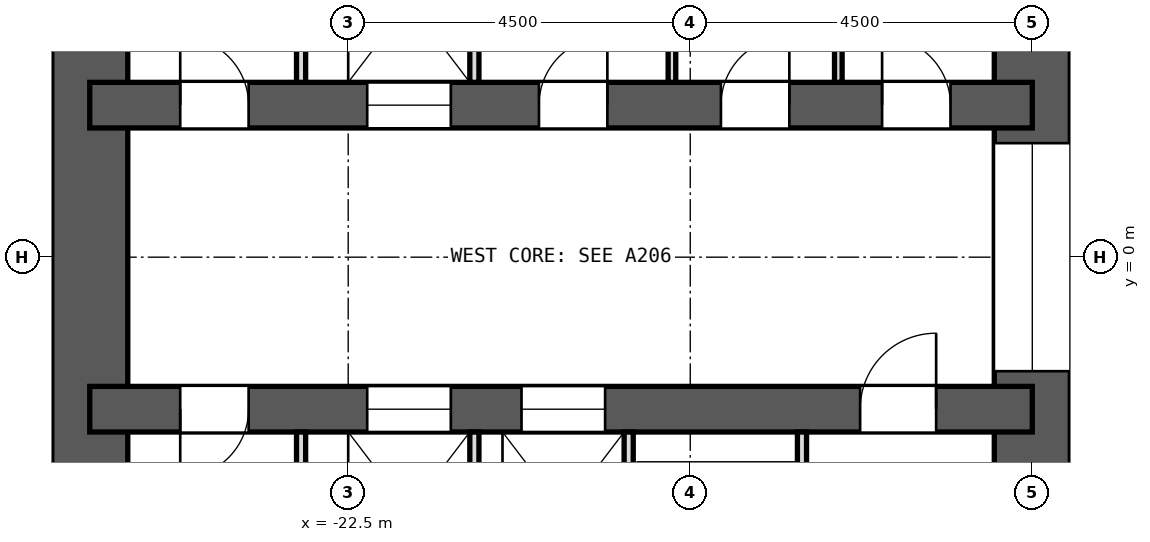
"""IFC4 building model, lengths in metres.
Left out: names, types, materials, properties, quantities, classifications, styles, units other than length and angle.
Written with IfcOpenShell. Run it as: python <this file> out.ifc"""

import sys

from ifc_helpers import new_model, si_unit, direction, frame, frame_2d, origin, place, context, subcontext, project, spatial, rectangle, extrude, element, fill, save


model = new_model("IFC4")
c1 = context("Model", 3, precision=1e-05, world=origin(), true_north=direction((0.0, 1.0)))
c2 = subcontext(c1, "Body", "Model", "MODEL_VIEW")
j1 = project(units=[si_unit("LENGTHUNIT", "METRE"), si_unit("PLANEANGLEUNIT", "RADIAN")], contexts=[c1])
p1 = place(None, origin())
s1 = spatial("IfcSite", under=j1, at=p1, CompositionType="ELEMENT")
p2 = place(p1, origin())
s2 = spatial("IfcBuilding", under=s1, at=p2, CompositionType="ELEMENT")
p3 = place(p2, frame((0.0, 0.0, 13.4)))
s3 = spatial("IfcBuildingStorey", under=s2, at=p3, CompositionType="ELEMENT", Elevation=13.4)
p4 = place(p3, frame((-13.5, -9.0, 0.0), z_axis=(0.0, 0.0, 1.0), x_axis=(0.0, 1.0, 0.0)))
e1 = element("IfcWall", 1, at=p4, inside=s3, PredefinedType="SHEAR", context=c2, shape_type="SweptSolid", body=[
    extrude(rectangle(XDim=18.0, YDim=1.0, at=frame_2d((9.0, 0.0))), origin(), (0.0, 0.0, 1.0), 4.2),
])
p5 = place(p4, frame((15.4, 0.0, 0.0)))
e2 = element("IfcOpeningElement", 2, at=p5, cuts=e1, PredefinedType="OPENING", context=c2, shape_type="SweptSolid", body=[
    extrude(rectangle(XDim=1.2, YDim=2.1, at=frame_2d((0.6, 1.05))), frame((0.0, 0.512, 0.0), z_axis=(0.0, -1.0, 0.0), x_axis=(1.0, 0.0, 0.0)), (0.0, 0.0, 1.0), 1.024),
])
p6 = place(p4, frame((1.4, 0.0, 0.0)))
e3 = element("IfcOpeningElement", 3, at=p6, cuts=e1, PredefinedType="OPENING", context=c2, shape_type="SweptSolid", body=[
    extrude(rectangle(XDim=1.2, YDim=2.1, at=frame_2d((0.6, 1.05))), frame((0.0, 0.512, 0.0), z_axis=(0.0, -1.0, 0.0), x_axis=(1.0, 0.0, 0.0)), (0.0, 0.0, 1.0), 1.024),
])
p7 = place(p4, frame((7.5, 0.0, 0.0)))
e4 = element("IfcOpeningElement", 4, at=p7, cuts=e1, PredefinedType="OPENING", context=c2, shape_type="SweptSolid", body=[
    extrude(rectangle(XDim=3.0, YDim=2.4, at=frame_2d((1.5, 1.2))), frame((0.0, 0.512, 0.0), z_axis=(0.0, -1.0, 0.0), x_axis=(1.0, 0.0, 0.0)), (0.0, 0.0, 1.0), 1.024),
])
p8 = place(p3, frame((-25.9, -9.0, 0.0), z_axis=(0.0, 0.0, 1.0), x_axis=(0.0, 1.0, 0.0)))
e5 = element("IfcWall", 5, at=p8, inside=s3, PredefinedType="SHEAR", context=c2, shape_type="SweptSolid", body=[
    extrude(rectangle(XDim=18.0, YDim=1.0, at=frame_2d((9.0, 0.0))), origin(), (0.0, 0.0, 1.0), 4.2),
])
p9 = place(p3, frame((-13.5, 2.0, 0.0), z_axis=(0.0, 0.0, 1.0), x_axis=(-1.0, 0.0, 0.0)))
e6 = element("IfcWall", 6, at=p9, inside=s3, PredefinedType="SHEAR", context=c2, shape_type="SweptSolid", body=[
    extrude(rectangle(XDim=12.4, YDim=0.6, at=frame_2d((6.2, 0.0))), origin(), (0.0, 0.0, 1.0), 4.2),
])
p10 = place(p9, frame((7.65, 0.0, 0.0)))
e7 = element("IfcOpeningElement", 7, at=p10, cuts=e6, PredefinedType="OPENING", context=c2, shape_type="SweptSolid", body=[
    extrude(rectangle(XDim=1.1, YDim=2.1, at=frame_2d((0.55, 1.05))), frame((0.0, 0.312, 0.0), z_axis=(0.0, -1.0, 0.0), x_axis=(1.0, 0.0, 0.0)), (0.0, 0.0, 1.0), 0.624),
])
p11 = place(p9, frame((1.076, 0.0, 0.0)))
e8 = element("IfcOpeningElement", 8, at=p11, cuts=e6, PredefinedType="OPENING", context=c2, shape_type="SweptSolid", body=[
    extrude(rectangle(XDim=0.9, YDim=2.1, at=frame_2d((0.45, 1.05))), frame((0.0, 0.312, 0.0), z_axis=(0.0, -1.0, 0.0), x_axis=(1.0, 0.0, 0.0)), (0.0, 0.0, 1.0), 0.624),
])
p12 = place(p9, frame((3.196, 0.0, 0.0)))
e9 = element("IfcOpeningElement", 9, at=p12, cuts=e6, PredefinedType="OPENING", context=c2, shape_type="SweptSolid", body=[
    extrude(rectangle(XDim=0.9, YDim=2.1, at=frame_2d((0.45, 1.05))), frame((0.0, 0.312, 0.0), z_axis=(0.0, -1.0, 0.0), x_axis=(1.0, 0.0, 0.0)), (0.0, 0.0, 1.0), 0.624),
])
p13 = place(p9, frame((5.59, 0.0, 0.0)))
e10 = element("IfcOpeningElement", 10, at=p13, cuts=e6, PredefinedType="OPENING", context=c2, shape_type="SweptSolid", body=[
    extrude(rectangle(XDim=0.9, YDim=2.1, at=frame_2d((0.45, 1.05))), frame((0.0, 0.312, 0.0), z_axis=(0.0, -1.0, 0.0), x_axis=(1.0, 0.0, 0.0)), (0.0, 0.0, 1.0), 0.624),
])
p14 = place(p9, frame((10.31, 0.0, 0.0)))
e11 = element("IfcOpeningElement", 11, at=p14, cuts=e6, PredefinedType="OPENING", context=c2, shape_type="SweptSolid", body=[
    extrude(rectangle(XDim=0.9, YDim=2.1, at=frame_2d((0.45, 1.05))), frame((0.0, 0.312, 0.0), z_axis=(0.0, -1.0, 0.0), x_axis=(1.0, 0.0, 0.0)), (0.0, 0.0, 1.0), 0.624),
])
p15 = place(p3, frame((-13.5, -2.0, 0.0), z_axis=(0.0, 0.0, 1.0), x_axis=(-1.0, 0.0, 0.0)))
e12 = element("IfcWall", 12, at=p15, inside=s3, PredefinedType="SHEAR", context=c2, shape_type="SweptSolid", body=[
    extrude(rectangle(XDim=12.4, YDim=0.6, at=frame_2d((6.2, 0.0))), origin(), (0.0, 0.0, 1.0), 4.2),
])
p16 = place(p15, frame((5.62, 0.0, 0.0)))
e13 = element("IfcOpeningElement", 13, at=p16, cuts=e12, PredefinedType="OPENING", context=c2, shape_type="SweptSolid", body=[
    extrude(rectangle(XDim=1.1, YDim=2.1, at=frame_2d((0.55, 1.05))), frame((0.0, 0.312, 0.0), z_axis=(0.0, -1.0, 0.0), x_axis=(1.0, 0.0, 0.0)), (0.0, 0.0, 1.0), 0.624),
])
p17 = place(p15, frame((7.65, 0.0, 0.0)))
e14 = element("IfcOpeningElement", 14, at=p17, cuts=e12, PredefinedType="OPENING", context=c2, shape_type="SweptSolid", body=[
    extrude(rectangle(XDim=1.1, YDim=2.1, at=frame_2d((0.55, 1.05))), frame((0.0, 0.312, 0.0), z_axis=(0.0, -1.0, 0.0), x_axis=(1.0, 0.0, 0.0)), (0.0, 0.0, 1.0), 0.624),
])
p18 = place(p15, frame((1.265, 0.0, 0.0)))
e15 = element("IfcOpeningElement", 15, at=p18, cuts=e12, PredefinedType="OPENING", context=c2, shape_type="SweptSolid", body=[
    extrude(rectangle(XDim=1.0, YDim=2.1, at=frame_2d((0.5, 1.05))), frame((0.0, 0.312, 0.0), z_axis=(0.0, -1.0, 0.0), x_axis=(1.0, 0.0, 0.0)), (0.0, 0.0, 1.0), 0.624),
])
p19 = place(p15, frame((10.31, 0.0, 0.0)))
e16 = element("IfcOpeningElement", 16, at=p19, cuts=e12, PredefinedType="OPENING", context=c2, shape_type="SweptSolid", body=[
    extrude(rectangle(XDim=0.9, YDim=2.1, at=frame_2d((0.45, 1.05))), frame((0.0, 0.312, 0.0), z_axis=(0.0, -1.0, 0.0), x_axis=(1.0, 0.0, 0.0)), (0.0, 0.0, 1.0), 0.624),
])
for number, where, z_axis, x_axis in (
    (17, (-16.052, 2.3, 0.0), (0.0, 0.0, 1.0), (0.0, 1.0, 0.0)),
    (18, (-18.241, 2.3, 0.0), (0.0, 0.0, 1.0), (0.0, 1.0, 0.0)),
):
    element("IfcWall", number, at=place(p3, frame(where, z_axis=z_axis, x_axis=x_axis)), inside=s3, PredefinedType="PARTITIONING", context=c2, shape_type="SweptSolid", body=[
        extrude(rectangle(XDim=2.4, YDim=0.1, at=frame_2d((1.2, 0.0))), origin(), (0.0, 0.0, 1.0), 3.65),
    ])
for number, where, z_axis, x_axis in (
    (19, (-20.84, 2.3, 0.0), (0.0, 0.0, 1.0), (0.0, 1.0, 0.0)),
    (20, (-23.12, 2.3, 0.0), (0.0, 0.0, 1.0), (0.0, 1.0, 0.0)),
):
    element("IfcWall", number, at=place(p3, frame(where, z_axis=z_axis, x_axis=x_axis)), inside=s3, PredefinedType="PARTITIONING", context=c2, shape_type="SweptSolid", body=[
        extrude(rectangle(XDim=2.4, YDim=0.12, at=frame_2d((1.2, 0.0))), origin(), (0.0, 0.0, 1.0), 3.65),
    ])
p20 = place(p3, frame((-16.53, -4.7, 0.0), z_axis=(0.0, 0.0, 1.0), x_axis=(0.0, 1.0, 0.0)))
e21 = element("IfcWall", 21, at=p20, inside=s3, PredefinedType="PARTITIONING", context=c2, shape_type="SweptSolid", body=[
    extrude(rectangle(XDim=2.4, YDim=0.12, at=frame_2d((1.2, 0.0))), origin(), (0.0, 0.0, 1.0), 3.65),
])
p21 = place(p20, frame((0.65, 0.0, 0.0)))
e22 = element("IfcOpeningElement", 22, at=p21, cuts=e21, PredefinedType="OPENING", context=c2, shape_type="SweptSolid", body=[
    extrude(rectangle(XDim=1.1, YDim=2.1, at=frame_2d((0.55, 1.05))), frame((0.0, 0.072, 0.0), z_axis=(0.0, -1.0, 0.0), x_axis=(1.0, 0.0, 0.0)), (0.0, 0.0, 1.0), 0.144),
])
for number, where, z_axis, x_axis in (
    (23, (-18.81, -4.7, 0.0), (0.0, 0.0, 1.0), (0.0, 1.0, 0.0)),
    (24, (-20.84, -4.7, 0.0), (0.0, 0.0, 1.0), (0.0, 1.0, 0.0)),
    (25, (-23.12, -4.7, 0.0), (0.0, 0.0, 1.0), (0.0, 1.0, 0.0)),
):
    element("IfcWall", number, at=place(p3, frame(where, z_axis=z_axis, x_axis=x_axis)), inside=s3, PredefinedType="PARTITIONING", context=c2, shape_type="SweptSolid", body=[
        extrude(rectangle(XDim=2.4, YDim=0.12, at=frame_2d((1.2, 0.0))), origin(), (0.0, 0.0, 1.0), 3.65),
    ])
p22 = place(p10, origin())
e26 = element("IfcDoor", 26, at=p22, inside=s3, OperationType="DOUBLE_DOOR_SLIDING", PredefinedType="DOOR", context=c2, shape_type="SweptSolid", body=[
    extrude(rectangle(XDim=1.1, YDim=2.1, at=frame_2d((0.55, 1.05))), frame((0.0, 0.025, 0.0), z_axis=(0.0, -1.0, 0.0), x_axis=(1.0, 0.0, 0.0)), (0.0, 0.0, 1.0), 0.05),
])
fill(e7, e26)
p23 = place(p16, origin())
e27 = element("IfcDoor", 27, at=p23, inside=s3, OperationType="DOUBLE_DOOR_SLIDING", PredefinedType="DOOR", context=c2, shape_type="SweptSolid", body=[
    extrude(rectangle(XDim=1.1, YDim=2.1, at=frame_2d((0.55, 1.05))), frame((0.0, 0.025, 0.0), z_axis=(0.0, -1.0, 0.0), x_axis=(1.0, 0.0, 0.0)), (0.0, 0.0, 1.0), 0.05),
])
fill(e13, e27)
p24 = place(p17, origin())
e28 = element("IfcDoor", 28, at=p24, inside=s3, OperationType="DOUBLE_DOOR_SLIDING", PredefinedType="DOOR", context=c2, shape_type="SweptSolid", body=[
    extrude(rectangle(XDim=1.1, YDim=2.1, at=frame_2d((0.55, 1.05))), frame((0.0, 0.025, 0.0), z_axis=(0.0, -1.0, 0.0), x_axis=(1.0, 0.0, 0.0)), (0.0, 0.0, 1.0), 0.05),
])
fill(e14, e28)
p25 = place(p11, frame((0.9, 0.0, 0.0), z_axis=(0.0, 0.0, 1.0), x_axis=(-1.0, 0.0, 0.0)))
e29 = element("IfcDoor", 29, at=p25, inside=s3, OperationType="SINGLE_SWING_LEFT", PredefinedType="DOOR", context=c2, shape_type="SweptSolid", body=[
    extrude(rectangle(XDim=0.9, YDim=2.1, at=frame_2d((0.45, 1.05))), frame((0.0, 0.025, 0.0), z_axis=(0.0, -1.0, 0.0), x_axis=(1.0, 0.0, 0.0)), (0.0, 0.0, 1.0), 0.05),
])
fill(e8, e29)
p26 = place(p12, frame((0.9, 0.0, 0.0), z_axis=(0.0, 0.0, 1.0), x_axis=(-1.0, 0.0, 0.0)))
e30 = element("IfcDoor", 30, at=p26, inside=s3, OperationType="SINGLE_SWING_RIGHT", PredefinedType="DOOR", context=c2, shape_type="SweptSolid", body=[
    extrude(rectangle(XDim=0.9, YDim=2.1, at=frame_2d((0.45, 1.05))), frame((0.0, 0.025, 0.0), z_axis=(0.0, -1.0, 0.0), x_axis=(1.0, 0.0, 0.0)), (0.0, 0.0, 1.0), 0.05),
])
fill(e9, e30)
p27 = place(p13, frame((0.9, 0.0, 0.0), z_axis=(0.0, 0.0, 1.0), x_axis=(-1.0, 0.0, 0.0)))
e31 = element("IfcDoor", 31, at=p27, inside=s3, OperationType="SINGLE_SWING_RIGHT", PredefinedType="DOOR", context=c2, shape_type="SweptSolid", body=[
    extrude(rectangle(XDim=0.9, YDim=2.1, at=frame_2d((0.45, 1.05))), frame((0.0, 0.025, 0.0), z_axis=(0.0, -1.0, 0.0), x_axis=(1.0, 0.0, 0.0)), (0.0, 0.0, 1.0), 0.05),
])
fill(e10, e31)
p28 = place(p14, frame((0.9, 0.0, 0.0), z_axis=(0.0, 0.0, 1.0), x_axis=(-1.0, 0.0, 0.0)))
e32 = element("IfcDoor", 32, at=p28, inside=s3, OperationType="SINGLE_SWING_LEFT", PredefinedType="DOOR", context=c2, shape_type="SweptSolid", body=[
    extrude(rectangle(XDim=0.9, YDim=2.1, at=frame_2d((0.45, 1.05))), frame((0.0, 0.025, 0.0), z_axis=(0.0, -1.0, 0.0), x_axis=(1.0, 0.0, 0.0)), (0.0, 0.0, 1.0), 0.05),
])
fill(e11, e32)
p29 = place(p18, frame((1.0, 0.0, 0.0), z_axis=(0.0, 0.0, 1.0), x_axis=(-1.0, 0.0, 0.0)))
e33 = element("IfcDoor", 33, at=p29, inside=s3, OperationType="SINGLE_SWING_RIGHT", PredefinedType="DOOR", context=c2, shape_type="SweptSolid", body=[
    extrude(rectangle(XDim=1.0, YDim=2.1, at=frame_2d((0.5, 1.05))), frame((0.0, 0.025, 0.0), z_axis=(0.0, -1.0, 0.0), x_axis=(1.0, 0.0, 0.0)), (0.0, 0.0, 1.0), 0.05),
])
fill(e15, e33)
p30 = place(p19, origin())
e34 = element("IfcDoor", 34, at=p30, inside=s3, OperationType="SINGLE_SWING_RIGHT", PredefinedType="DOOR", context=c2, shape_type="SweptSolid", body=[
    extrude(rectangle(XDim=0.9, YDim=2.1, at=frame_2d((0.45, 1.05))), frame((0.0, 0.025, 0.0), z_axis=(0.0, -1.0, 0.0), x_axis=(1.0, 0.0, 0.0)), (0.0, 0.0, 1.0), 0.05),
])
fill(e16, e34)
p31 = place(p7, origin())
e35 = element("IfcDoor", 35, at=p31, inside=s3, OperationType="DOUBLE_DOOR_SLIDING", PredefinedType="DOOR", context=c2, shape_type="SweptSolid", body=[
    extrude(rectangle(XDim=3.0, YDim=2.4, at=frame_2d((1.5, 1.2))), frame((0.0, 0.025, 0.0), z_axis=(0.0, -1.0, 0.0), x_axis=(1.0, 0.0, 0.0)), (0.0, 0.0, 1.0), 0.05),
])
fill(e4, e35)
save(model, sys.argv[1])
